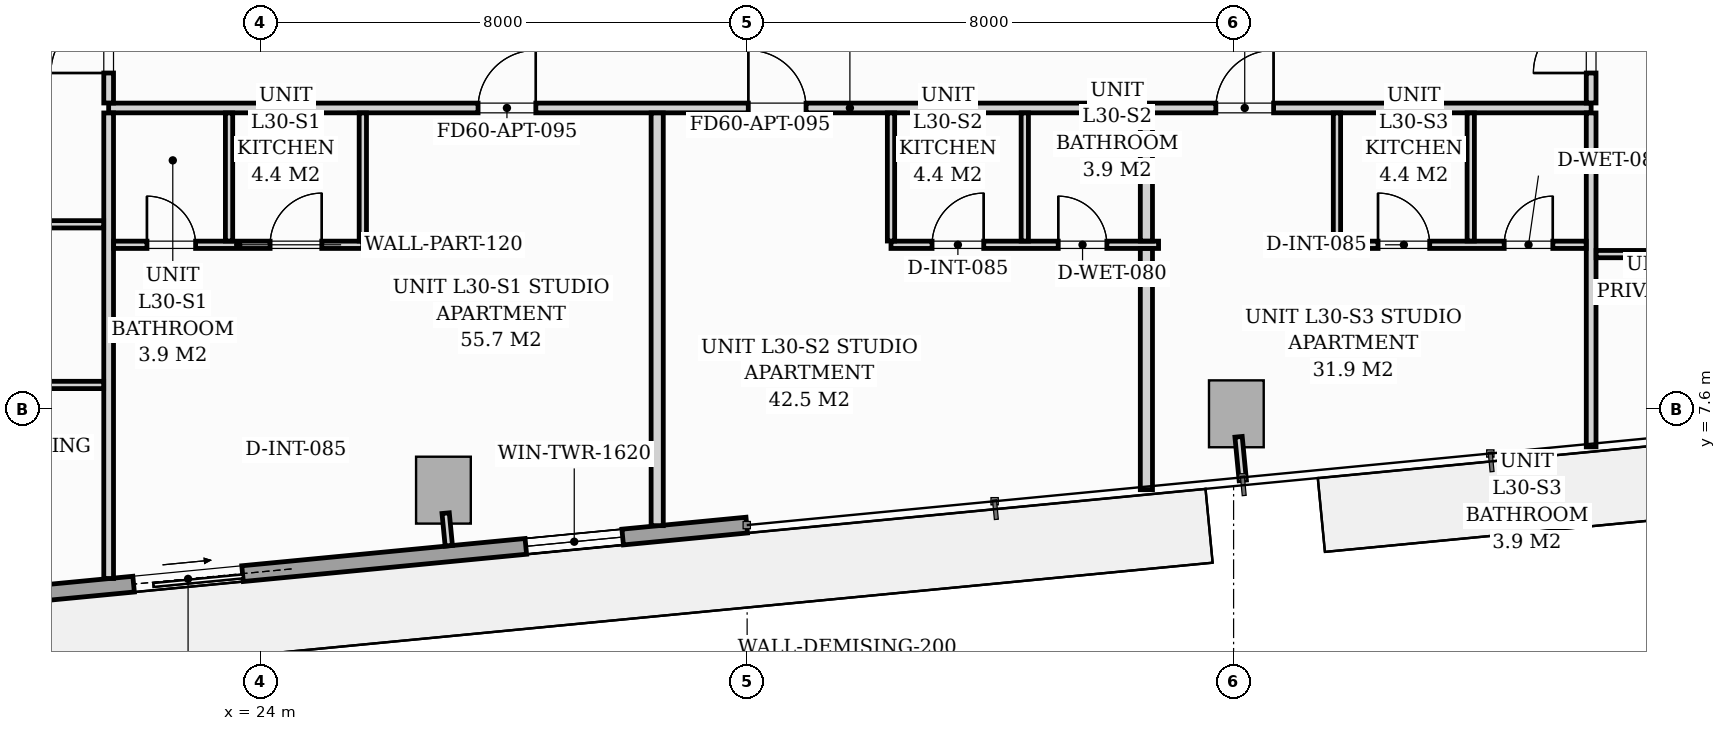
"""IFC4 building model, lengths in metres.
Left out: names, types, materials, properties, quantities, classifications, styles, units other than length and angle.
Written with IfcOpenShell. Run it as: python <this file> out.ifc"""

import sys

from ifc_helpers import new_model, si_unit, direction, frame, frame_2d, origin, origin_2d, place, context, subcontext, project, spatial, rectangle, extrude, source, transform, mapped, element, fill, save


model = new_model("IFC4")
c1 = context("Model", 3, precision=1e-05, world=origin(), true_north=direction((0.0, 1.0)))
c2 = subcontext(c1, "Body", "Model", "MODEL_VIEW")
j1 = project(units=[si_unit("LENGTHUNIT", "METRE"), si_unit("PLANEANGLEUNIT", "RADIAN")], contexts=[c1])
p1 = place(None, origin())
s1 = spatial("IfcSite", under=j1, at=p1, CompositionType="ELEMENT")
p2 = place(p1, origin())
s2 = spatial("IfcBuilding", under=s1, at=p2, CompositionType="ELEMENT")
p3 = place(p2, frame((0.0, 0.0, 106.6)))
s3 = spatial("IfcBuildingStorey", under=s2, at=p3, CompositionType="ELEMENT", Elevation=106.6)
m1 = source(origin(), c2, "Body", "SweptSolid", [
    extrude(rectangle(XDim=0.9, YDim=1.1, at=origin_2d()), origin(), (0.0, 0.0, 1.0), 3.196),
])
for number, where, z_axis, x_axis in (
    (1, (27.006, 6.265, 0.002), (0.0, 0.0, 1.0), (0.995, 0.096, 0.0)),
    (2, (40.045, 7.521, 0.002), (0.0, 0.0, 1.0), (0.995, 0.096, 0.0)),
):
    element("IfcColumn", number, at=place(p3, frame(where, z_axis=z_axis, x_axis=x_axis)), inside=s3, PredefinedType="COLUMN", context=c2, shape_type="MappedRepresentation", body=[
        mapped(m1, transform((0.0, 0.0, 0.0), scale=1.0)),
    ])
p4 = place(p3, frame((31.994, 5.69, 0.0), z_axis=(0.0, 0.0, 1.0), x_axis=(-0.995396521236, -0.095842399342, 0.0)))
e3 = element("IfcWall", 3, at=p4, inside=s3, PredefinedType="STANDARD", context=c2, shape_type="SweptSolid", body=[
    extrude(rectangle(XDim=19.11, YDim=0.26, at=frame_2d((9.555, 0.0))), origin(), (0.0, 0.0, 1.0), 2.94),
])
p5 = place(p4, frame((8.33, 0.0, 0.0)))
e4 = element("IfcOpeningElement", 4, at=p5, cuts=e3, PredefinedType="OPENING", context=c2, shape_type="SweptSolid", body=[
    extrude(rectangle(XDim=1.8, YDim=2.06, at=frame_2d((0.9, 1.03))), frame((0.0, 0.14, 0.0), z_axis=(0.0, -1.0, 0.0), x_axis=(1.0, 0.0, 0.0)), (0.0, 0.0, 1.0), 0.28),
])
p6 = place(p4, frame((2.05, 0.0, 0.65)))
e5 = element("IfcOpeningElement", 5, at=p6, cuts=e3, PredefinedType="OPENING", context=c2, shape_type="SweptSolid", body=[
    extrude(rectangle(XDim=1.6, YDim=1.5, at=frame_2d((0.8, 0.75))), frame((0.0, 0.14, 0.0), z_axis=(0.0, -1.0, 0.0), x_axis=(1.0, 0.0, 0.0)), (0.0, 0.0, 1.0), 0.28),
])
p7 = place(p3, frame((21.5, 12.55, 0.0), z_axis=(0.0, 0.0, 1.0), x_axis=(1.0, 0.0, 0.0)))
e6 = element("IfcWall", 6, at=p7, inside=s3, PredefinedType="PARTITIONING", context=c2, shape_type="SweptSolid", body=[
    extrude(rectangle(XDim=24.38, YDim=0.16, at=frame_2d((12.19, 0.0))), origin(), (0.0, 0.0, 1.0), 2.94),
])
p8 = place(p7, frame((6.075, 0.0, 0.0)))
e7 = element("IfcOpeningElement", 7, at=p8, cuts=e6, PredefinedType="OPENING", context=c2, shape_type="SweptSolid", body=[
    extrude(rectangle(XDim=0.95, YDim=2.06, at=frame_2d((0.475, 1.03))), frame((0.0, 0.09, 0.0), z_axis=(0.0, -1.0, 0.0), x_axis=(1.0, 0.0, 0.0)), (0.0, 0.0, 1.0), 0.18),
])
p9 = place(p7, frame((10.519, 0.0, 0.0)))
e8 = element("IfcOpeningElement", 8, at=p9, cuts=e6, PredefinedType="OPENING", context=c2, shape_type="SweptSolid", body=[
    extrude(rectangle(XDim=0.95, YDim=2.06, at=frame_2d((0.475, 1.03))), frame((0.0, 0.09, 0.0), z_axis=(0.0, -1.0, 0.0), x_axis=(1.0, 0.0, 0.0)), (0.0, 0.0, 1.0), 0.18),
])
p10 = place(p7, frame((18.208, 0.0, 0.0)))
e9 = element("IfcOpeningElement", 9, at=p10, cuts=e6, PredefinedType="OPENING", context=c2, shape_type="SweptSolid", body=[
    extrude(rectangle(XDim=0.95, YDim=2.06, at=frame_2d((0.475, 1.03))), frame((0.0, 0.09, 0.0), z_axis=(0.0, -1.0, 0.0), x_axis=(1.0, 0.0, 0.0)), (0.0, 0.0, 1.0), 0.18),
])
p11 = place(p3, frame((21.5, 4.812, 0.0), z_axis=(0.0, 0.0, 1.0), x_axis=(0.0, 1.0, 0.0)))
e10 = element("IfcWall", 10, at=p11, inside=s3, PredefinedType="PARTITIONING", context=c2, shape_type="SweptSolid", body=[
    extrude(rectangle(XDim=7.656, YDim=0.16, at=frame_2d((3.828, 0.0))), origin(), (0.0, 0.0, 1.0), 2.94),
])
p12 = place(p3, frame((21.5, 12.632, 0.0), z_axis=(0.0, 0.0, 1.0), x_axis=(0.0, 1.0, 0.0)))
e11 = element("IfcWall", 11, at=p12, inside=s3, PredefinedType="PARTITIONING", context=c2, shape_type="SweptSolid", body=[
    extrude(rectangle(XDim=11.747, YDim=0.16, at=frame_2d((5.873, 0.0))), origin(), (0.0, 0.0, 1.0), 2.94),
])
p13 = place(p12, frame((0.493, 0.0, 0.0)))
e12 = element("IfcOpeningElement", 12, at=p13, cuts=e11, PredefinedType="OPENING", context=c2, shape_type="SweptSolid", body=[
    extrude(rectangle(XDim=0.95, YDim=2.06, at=frame_2d((0.475, 1.03))), frame((0.0, 0.09, 0.0), z_axis=(0.0, -1.0, 0.0), x_axis=(1.0, 0.0, 0.0)), (0.0, 0.0, 1.0), 0.18),
])
p14 = place(p3, frame((45.88, 6.977, 0.0), z_axis=(0.0, 0.0, 1.0), x_axis=(0.0, 1.0, 0.0)))
e13 = element("IfcWall", 13, at=p14, inside=s3, PredefinedType="PARTITIONING", context=c2, shape_type="SweptSolid", body=[
    extrude(rectangle(XDim=5.491, YDim=0.16, at=frame_2d((2.745, 0.0))), origin(), (0.0, 0.0, 1.0), 2.94),
])
p15 = place(p3, frame((45.88, 12.632, 0.0), z_axis=(0.0, 0.0, 1.0), x_axis=(0.0, 1.0, 0.0)))
e14 = element("IfcWall", 14, at=p15, inside=s3, PredefinedType="PARTITIONING", context=c2, shape_type="SweptSolid", body=[
    extrude(rectangle(XDim=4.466, YDim=0.16, at=frame_2d((2.233, 0.0))), origin(), (0.0, 0.0, 1.0), 2.94),
])
p16 = place(p15, frame((0.493, 0.0, 0.0)))
e15 = element("IfcOpeningElement", 15, at=p16, cuts=e14, PredefinedType="OPENING", context=c2, shape_type="SweptSolid", body=[
    extrude(rectangle(XDim=0.95, YDim=2.06, at=frame_2d((0.475, 1.03))), frame((0.0, 0.09, 0.0), z_axis=(0.0, -1.0, 0.0), x_axis=(1.0, 0.0, 0.0)), (0.0, 0.0, 1.0), 0.18),
])
p17 = place(p3, frame((21.582, 10.3, 0.0), z_axis=(0.0, 0.0, 1.0), x_axis=(1.0, 0.0, 0.0)))
e16 = element("IfcWall", 16, at=p17, inside=s3, PredefinedType="PARTITIONING", context=c2, shape_type="SweptSolid", body=[
    extrude(rectangle(XDim=4.098, YDim=0.12, at=frame_2d((2.049, 0.0))), origin(), (0.0, 0.0, 1.0), 2.94),
])
p18 = place(p17, frame((0.548, 0.0, 0.0)))
e17 = element("IfcOpeningElement", 17, at=p18, cuts=e16, PredefinedType="OPENING", context=c2, shape_type="SweptSolid", body=[
    extrude(rectangle(XDim=0.8, YDim=2.02, at=frame_2d((0.4, 1.01))), frame((0.0, 0.07, 0.0), z_axis=(0.0, -1.0, 0.0), x_axis=(1.0, 0.0, 0.0)), (0.0, 0.0, 1.0), 0.14),
])
p19 = place(p17, frame((2.573, 0.0, 0.0)))
e18 = element("IfcOpeningElement", 18, at=p19, cuts=e16, PredefinedType="OPENING", context=c2, shape_type="SweptSolid", body=[
    extrude(rectangle(XDim=0.85, YDim=2.05, at=frame_2d((0.425, 1.025))), frame((0.0, 0.07, 0.0), z_axis=(0.0, -1.0, 0.0), x_axis=(1.0, 0.0, 0.0)), (0.0, 0.0, 1.0), 0.14),
])
for number, where, z_axis, x_axis in (
    (19, (25.68, 10.362, 0.0), (0.0, 0.0, 1.0), (0.0, 1.0, 0.0)),
    (20, (23.48, 10.362, 0.0), (0.0, 0.0, 1.0), (0.0, 1.0, 0.0)),
):
    element("IfcWall", number, at=place(p3, frame(where, z_axis=z_axis, x_axis=x_axis)), inside=s3, PredefinedType="PARTITIONING", context=c2, shape_type="SweptSolid", body=[
        extrude(rectangle(XDim=2.106, YDim=0.12, at=frame_2d((1.053, 0.0))), origin(), (0.0, 0.0, 1.0), 2.94),
    ])
p20 = place(p3, frame((30.521, 5.681, 0.0), z_axis=(0.0, 0.0, 1.0), x_axis=(0.0, 1.0, 0.0)))
e21 = element("IfcWall", 21, at=p20, inside=s3, PredefinedType="PARTITIONING", context=c2, shape_type="SweptSolid", body=[
    extrude(rectangle(XDim=6.787, YDim=0.2, at=frame_2d((3.394, 0.0))), origin(), (0.0, 0.0, 1.0), 2.94),
])
p21 = place(p3, frame((34.366, 10.3, 0.0), z_axis=(0.0, 0.0, 1.0), x_axis=(1.0, 0.0, 0.0)))
e22 = element("IfcWall", 22, at=p21, inside=s3, PredefinedType="PARTITIONING", context=c2, shape_type="SweptSolid", body=[
    extrude(rectangle(XDim=4.4, YDim=0.12, at=frame_2d((2.2, 0.0))), origin(), (0.0, 0.0, 1.0), 2.94),
])
p22 = place(p21, frame((0.675, 0.0, 0.0)))
e23 = element("IfcOpeningElement", 23, at=p22, cuts=e22, PredefinedType="OPENING", context=c2, shape_type="SweptSolid", body=[
    extrude(rectangle(XDim=0.85, YDim=2.05, at=frame_2d((0.425, 1.025))), frame((0.0, 0.07, 0.0), z_axis=(0.0, -1.0, 0.0), x_axis=(1.0, 0.0, 0.0)), (0.0, 0.0, 1.0), 0.14),
])
p23 = place(p21, frame((2.75, 0.0, 0.0)))
e24 = element("IfcOpeningElement", 24, at=p23, cuts=e22, PredefinedType="OPENING", context=c2, shape_type="SweptSolid", body=[
    extrude(rectangle(XDim=0.8, YDim=2.02, at=frame_2d((0.4, 1.01))), frame((0.0, 0.07, 0.0), z_axis=(0.0, -1.0, 0.0), x_axis=(1.0, 0.0, 0.0)), (0.0, 0.0, 1.0), 0.14),
])
for number, where, z_axis, x_axis in (
    (25, (34.366, 10.362, 0.0), (0.0, 0.0, 1.0), (0.0, 1.0, 0.0)),
    (26, (36.566, 10.362, 0.0), (0.0, 0.0, 1.0), (0.0, 1.0, 0.0)),
):
    element("IfcWall", number, at=place(p3, frame(where, z_axis=z_axis, x_axis=x_axis)), inside=s3, PredefinedType="PARTITIONING", context=c2, shape_type="SweptSolid", body=[
        extrude(rectangle(XDim=2.106, YDim=0.12, at=frame_2d((1.053, 0.0))), origin(), (0.0, 0.0, 1.0), 2.94),
    ])
p24 = place(p3, frame((38.566, 6.273, 0.0), z_axis=(0.0, 0.0, 1.0), x_axis=(0.0, 1.0, 0.0)))
e27 = element("IfcWall", 27, at=p24, inside=s3, PredefinedType="PARTITIONING", context=c2, shape_type="SweptSolid", body=[
    extrude(rectangle(XDim=3.965, YDim=0.2, at=frame_2d((1.982, 0.0))), origin(), (0.0, 0.0, 1.0), 2.94),
])
p25 = place(p3, frame((38.566, 10.362, 0.0), z_axis=(0.0, 0.0, 1.0), x_axis=(0.0, 1.0, 0.0)))
e28 = element("IfcWall", 28, at=p25, inside=s3, PredefinedType="PARTITIONING", context=c2, shape_type="SweptSolid", body=[
    extrude(rectangle(XDim=2.106, YDim=0.2, at=frame_2d((1.053, 0.0))), origin(), (0.0, 0.0, 1.0), 2.94),
])
p26 = place(p3, frame((41.7, 10.3, 0.0), z_axis=(0.0, 0.0, 1.0), x_axis=(1.0, 0.0, 0.0)))
e29 = element("IfcWall", 29, at=p26, inside=s3, PredefinedType="PARTITIONING", context=c2, shape_type="SweptSolid", body=[
    extrude(rectangle(XDim=4.098, YDim=0.12, at=frame_2d((2.049, 0.0))), origin(), (0.0, 0.0, 1.0), 2.94),
])
p27 = place(p26, frame((0.675, 0.0, 0.0)))
e30 = element("IfcOpeningElement", 30, at=p27, cuts=e29, PredefinedType="OPENING", context=c2, shape_type="SweptSolid", body=[
    extrude(rectangle(XDim=0.85, YDim=2.05, at=frame_2d((0.425, 1.025))), frame((0.0, 0.07, 0.0), z_axis=(0.0, -1.0, 0.0), x_axis=(1.0, 0.0, 0.0)), (0.0, 0.0, 1.0), 0.14),
])
p28 = place(p26, frame((2.75, 0.0, 0.0)))
e31 = element("IfcOpeningElement", 31, at=p28, cuts=e29, PredefinedType="OPENING", context=c2, shape_type="SweptSolid", body=[
    extrude(rectangle(XDim=0.8, YDim=2.02, at=frame_2d((0.4, 1.01))), frame((0.0, 0.07, 0.0), z_axis=(0.0, -1.0, 0.0), x_axis=(1.0, 0.0, 0.0)), (0.0, 0.0, 1.0), 0.14),
])
for number, where, z_axis, x_axis in (
    (32, (41.7, 10.362, 0.0), (0.0, 0.0, 1.0), (0.0, 1.0, 0.0)),
    (33, (43.9, 10.362, 0.0), (0.0, 0.0, 1.0), (0.0, 1.0, 0.0)),
):
    element("IfcWall", number, at=place(p3, frame(where, z_axis=z_axis, x_axis=x_axis)), inside=s3, PredefinedType="PARTITIONING", context=c2, shape_type="SweptSolid", body=[
        extrude(rectangle(XDim=2.106, YDim=0.12, at=frame_2d((1.053, 0.0))), origin(), (0.0, 0.0, 1.0), 2.94),
    ])
p29 = place(p3, frame((10.142, 7.995, 0.0), z_axis=(0.0, 0.0, 1.0), x_axis=(1.0, 0.0, 0.0)))
e34 = element("IfcWall", 34, at=p29, inside=s3, PredefinedType="PARTITIONING", context=c2, shape_type="SweptSolid", body=[
    extrude(rectangle(XDim=11.276, YDim=0.12, at=frame_2d((5.638, 0.0))), origin(), (0.0, 0.0, 1.0), 2.94),
])
p30 = place(p29, frame((6.481, 0.0, 0.0)))
e35 = element("IfcOpeningElement", 35, at=p30, cuts=e34, PredefinedType="OPENING", context=c2, shape_type="SweptSolid", body=[
    extrude(rectangle(XDim=0.85, YDim=2.05, at=frame_2d((0.425, 1.025))), frame((0.0, 0.07, 0.0), z_axis=(0.0, -1.0, 0.0), x_axis=(1.0, 0.0, 0.0)), (0.0, 0.0, 1.0), 0.14),
])
p31 = place(p3, frame((9.888, 10.637, 0.0), z_axis=(0.0, 0.0, 1.0), x_axis=(1.0, 0.0, 0.0)))
e36 = element("IfcWall", 36, at=p31, inside=s3, PredefinedType="PARTITIONING", context=c2, shape_type="SweptSolid", body=[
    extrude(rectangle(XDim=11.53, YDim=0.12, at=frame_2d((5.765, 0.0))), origin(), (0.0, 0.0, 1.0), 2.94),
])
p32 = place(p31, frame((6.735, 0.0, 0.0)))
e37 = element("IfcOpeningElement", 37, at=p32, cuts=e36, PredefinedType="OPENING", context=c2, shape_type="SweptSolid", body=[
    extrude(rectangle(XDim=0.85, YDim=2.05, at=frame_2d((0.425, 1.025))), frame((0.0, 0.07, 0.0), z_axis=(0.0, -1.0, 0.0), x_axis=(1.0, 0.0, 0.0)), (0.0, 0.0, 1.0), 0.14),
])
p33 = place(p3, frame((45.962, 10.147, 0.0), z_axis=(0.0, 0.0, 1.0), x_axis=(1.0, 0.0, 0.0)))
e38 = element("IfcWall", 38, at=p33, inside=s3, PredefinedType="PARTITIONING", context=c2, shape_type="SweptSolid", body=[
    extrude(rectangle(XDim=20.994, YDim=0.12, at=frame_2d((10.497, 0.0))), origin(), (0.0, 0.0, 1.0), 2.31),
])
p34 = place(p33, frame((10.227, 0.0, 0.0)))
e39 = element("IfcOpeningElement", 39, at=p34, cuts=e38, PredefinedType="OPENING", context=c2, shape_type="SweptSolid", body=[
    extrude(rectangle(XDim=0.85, YDim=2.05, at=frame_2d((0.425, 1.025))), frame((0.0, 0.07, 0.0), z_axis=(0.0, -1.0, 0.0), x_axis=(1.0, 0.0, 0.0)), (0.0, 0.0, 1.0), 0.14),
])
p35 = place(p3, frame((27.042, 5.887, 0.0), z_axis=(0.0, 0.0, 1.0), x_axis=(0.096222656154, -0.995359834654, 0.0)))
e40 = element("IfcWall", 40, at=p35, inside=s3, PredefinedType="PARTITIONING", context=c2, shape_type="SweptSolid", body=[
    extrude(rectangle(XDim=0.538, YDim=0.12, at=frame_2d((0.269, 0.0))), origin(), (0.0, 0.0, 1.0), 2.94),
])
p36 = place(p3, frame((40.082, 7.142, 0.0), z_axis=(0.0, 0.0, 1.0), x_axis=(0.095944965663, -0.995386640238, 0.0)))
e41 = element("IfcWall", 41, at=p36, inside=s3, PredefinedType="PARTITIONING", context=c2, shape_type="SweptSolid", body=[
    extrude(rectangle(XDim=0.72, YDim=0.12, at=frame_2d((0.36, 0.0))), origin(), (0.0, 0.0, 1.0), 2.94),
])
m2 = source(origin(), c2, "Body", "SweptSolid", [
    extrude(rectangle(XDim=1.8, YDim=2.06, at=frame_2d((0.9, 1.03))), frame((0.0, 0.025, 0.0), z_axis=(0.0, -1.0, 0.0), x_axis=(1.0, 0.0, 0.0)), (0.0, 0.0, 1.0), 0.05),
])
p37 = place(p5, origin())
e42 = element("IfcDoor", 42, at=p37, inside=s3, OperationType="SLIDING_TO_LEFT", PredefinedType="DOOR", context=c2, shape_type="MappedRepresentation", body=[
    mapped(m2, transform((0.0, 0.0, 0.0), scale=1.0)),
])
fill(e4, e42)
m3 = source(origin(), c2, "Body", "SweptSolid", [
    extrude(rectangle(XDim=1.6, YDim=1.5, at=frame_2d((0.8, 0.75))), frame((0.0, 0.03, 0.0), z_axis=(0.0, -1.0, 0.0), x_axis=(1.0, 0.0, 0.0)), (0.0, 0.0, 1.0), 0.06),
])
p38 = place(p6, origin())
e43 = element("IfcWindow", 43, at=p38, inside=s3, PartitioningType="SINGLE_PANEL", PredefinedType="WINDOW", context=c2, shape_type="MappedRepresentation", body=[
    mapped(m3, transform((0.0, 0.0, 0.0), scale=1.0)),
])
fill(e5, e43)
m4 = source(origin(), c2, "Body", "SweptSolid", [
    extrude(rectangle(XDim=0.95, YDim=2.06, at=frame_2d((0.475, 1.03))), frame((0.0, 0.025, 0.0), z_axis=(0.0, -1.0, 0.0), x_axis=(1.0, 0.0, 0.0)), (0.0, 0.0, 1.0), 0.05),
])
p39 = place(p8, origin())
e44 = element("IfcDoor", 44, at=p39, inside=s3, OperationType="SINGLE_SWING_RIGHT", PredefinedType="DOOR", context=c2, shape_type="MappedRepresentation", body=[
    mapped(m4, transform((0.0, 0.0, 0.0), scale=1.0)),
])
fill(e7, e44)
m5 = source(origin(), c2, "Body", "SweptSolid", [
    extrude(rectangle(XDim=0.8, YDim=2.02, at=frame_2d((0.4, 1.01))), frame((0.0, 0.025, 0.0), z_axis=(0.0, -1.0, 0.0), x_axis=(1.0, 0.0, 0.0)), (0.0, 0.0, 1.0), 0.05),
])
p40 = place(p18, origin())
e45 = element("IfcDoor", 45, at=p40, inside=s3, OperationType="SINGLE_SWING_LEFT", PredefinedType="DOOR", context=c2, shape_type="MappedRepresentation", body=[
    mapped(m5, transform((0.0, 0.0, 0.0), scale=1.0)),
])
fill(e17, e45)
m6 = source(origin(), c2, "Body", "SweptSolid", [
    extrude(rectangle(XDim=0.85, YDim=2.05, at=frame_2d((0.425, 1.025))), frame((0.0, 0.025, 0.0), z_axis=(0.0, -1.0, 0.0), x_axis=(1.0, 0.0, 0.0)), (0.0, 0.0, 1.0), 0.05),
])
p41 = place(p19, origin())
e46 = element("IfcDoor", 46, at=p41, inside=s3, OperationType="SINGLE_SWING_RIGHT", PredefinedType="DOOR", context=c2, shape_type="MappedRepresentation", body=[
    mapped(m6, transform((0.0, 0.0, 0.0), scale=1.0)),
])
fill(e18, e46)
p42 = place(p9, origin())
e47 = element("IfcDoor", 47, at=p42, inside=s3, OperationType="SINGLE_SWING_LEFT", PredefinedType="DOOR", context=c2, shape_type="MappedRepresentation", body=[
    mapped(m4, transform((0.0, 0.0, 0.0), scale=1.0)),
])
fill(e8, e47)
p43 = place(p22, origin())
e48 = element("IfcDoor", 48, at=p43, inside=s3, OperationType="SINGLE_SWING_RIGHT", PredefinedType="DOOR", context=c2, shape_type="MappedRepresentation", body=[
    mapped(m6, transform((0.0, 0.0, 0.0), scale=1.0)),
])
fill(e23, e48)
p44 = place(p23, origin())
e49 = element("IfcDoor", 49, at=p44, inside=s3, OperationType="SINGLE_SWING_LEFT", PredefinedType="DOOR", context=c2, shape_type="MappedRepresentation", body=[
    mapped(m5, transform((0.0, 0.0, 0.0), scale=1.0)),
])
fill(e24, e49)
p45 = place(p10, origin())
e50 = element("IfcDoor", 50, at=p45, inside=s3, OperationType="SINGLE_SWING_RIGHT", PredefinedType="DOOR", context=c2, shape_type="MappedRepresentation", body=[
    mapped(m4, transform((0.0, 0.0, 0.0), scale=1.0)),
])
fill(e9, e50)
p46 = place(p27, origin())
e51 = element("IfcDoor", 51, at=p46, inside=s3, OperationType="SINGLE_SWING_LEFT", PredefinedType="DOOR", context=c2, shape_type="MappedRepresentation", body=[
    mapped(m6, transform((0.0, 0.0, 0.0), scale=1.0)),
])
fill(e30, e51)
p47 = place(p28, origin())
e52 = element("IfcDoor", 52, at=p47, inside=s3, OperationType="SINGLE_SWING_RIGHT", PredefinedType="DOOR", context=c2, shape_type="MappedRepresentation", body=[
    mapped(m5, transform((0.0, 0.0, 0.0), scale=1.0)),
])
fill(e31, e52)
p48 = place(p13, origin())
e53 = element("IfcDoor", 53, at=p48, inside=s3, OperationType="SINGLE_SWING_LEFT", PredefinedType="DOOR", context=c2, shape_type="MappedRepresentation", body=[
    mapped(m4, transform((0.0, 0.0, 0.0), scale=1.0)),
])
fill(e12, e53)
p49 = place(p16, origin())
e54 = element("IfcDoor", 54, at=p49, inside=s3, OperationType="SINGLE_SWING_LEFT", PredefinedType="DOOR", context=c2, shape_type="MappedRepresentation", body=[
    mapped(m4, transform((0.0, 0.0, 0.0), scale=1.0)),
])
fill(e15, e54)
save(model, sys.argv[1])
